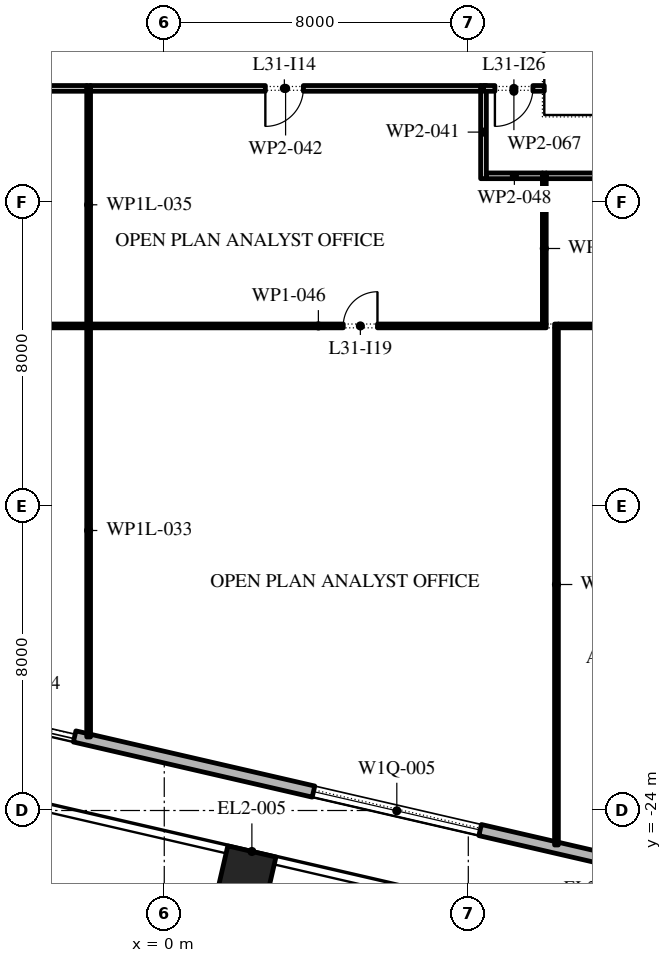
"""IFC4 building model, lengths in metres.
Left out: names, types, materials, properties, quantities, classifications, styles, units other than length and angle.
Written with IfcOpenShell. Run it as: python <this file> out.ifc"""

import sys

from ifc_helpers import new_model, si_unit, direction, frame, frame_2d, origin, origin_2d, place, context, subcontext, project, spatial, rectangle, extrude, element, fill, save


model = new_model("IFC4")
c1 = context("Model", 3, precision=1e-05, world=origin(), true_north=direction((0.0, 1.0)))
c2 = subcontext(c1, "Body", "Model", "MODEL_VIEW")
j1 = project(units=[si_unit("LENGTHUNIT", "METRE"), si_unit("PLANEANGLEUNIT", "RADIAN")], contexts=[c1])
p1 = place(None, origin())
s1 = spatial("IfcSite", under=j1, at=p1, CompositionType="ELEMENT")
p2 = place(p1, origin())
s2 = spatial("IfcBuilding", under=s1, at=p2, CompositionType="ELEMENT")
p3 = place(p2, frame((0.0, 0.0, 143.4)))
s3 = spatial("IfcBuildingStorey", under=s2, at=p3, CompositionType="ELEMENT", Elevation=143.4)
p4 = place(p3, frame((2.159, -25.711, 0.0), z_axis=(0.0, 0.0, 1.0), x_axis=(0.974370064785, -0.224951054344, 0.0)))
e1 = element("IfcColumn", 1, at=p4, inside=s3, PredefinedType="COLUMN", context=c2, shape_type="SweptSolid", body=[
    extrude(rectangle(XDim=1.3, YDim=1.3, at=origin_2d()), origin(), (0.0, 0.0, 1.0), 4.2),
])
p5 = place(p3, frame((-31.078, -15.421, 0.0), z_axis=(0.0, 0.0, 1.0), x_axis=(0.974370456532, -0.224949357493, 0.0)))
e2 = element("IfcWall", 2, at=p5, inside=s3, PredefinedType="STANDARD", context=c2, shape_type="SweptSolid", body=[
    extrude(rectangle(XDim=51.0, YDim=0.3, at=frame_2d((25.5, 0.0))), origin(), (0.0, 0.0, 1.0), 4.0),
])
p6 = place(p5, frame((1.875, 0.0, 0.45)))
e3 = element("IfcOpeningElement", 3, at=p6, cuts=e2, PredefinedType="OPENING", context=c2, shape_type="SweptSolid", body=[
    extrude(rectangle(XDim=4.5, YDim=2.575, at=frame_2d((2.25, 1.288))), frame((0.0, 0.16, 0.0), z_axis=(0.0, -1.0, 0.0), x_axis=(1.0, 0.0, 0.0)), (0.0, 0.0, 1.0), 0.32),
])
p7 = place(p5, frame((10.275, 0.0, 0.45)))
e4 = element("IfcOpeningElement", 4, at=p7, cuts=e2, PredefinedType="OPENING", context=c2, shape_type="SweptSolid", body=[
    extrude(rectangle(XDim=4.5, YDim=2.525, at=frame_2d((2.25, 1.262))), frame((0.0, 0.16, 0.0), z_axis=(0.0, -1.0, 0.0), x_axis=(1.0, 0.0, 0.0)), (0.0, 0.0, 1.0), 0.32),
])
p8 = place(p5, frame((18.825, 0.0, 0.45)))
e5 = element("IfcOpeningElement", 5, at=p8, cuts=e2, PredefinedType="OPENING", context=c2, shape_type="SweptSolid", body=[
    extrude(rectangle(XDim=4.5, YDim=2.5, at=frame_2d((2.25, 1.25))), frame((0.0, 0.16, 0.0), z_axis=(0.0, -1.0, 0.0), x_axis=(1.0, 0.0, 0.0)), (0.0, 0.0, 1.0), 0.32),
])
p9 = place(p5, frame((27.075, 0.0, 0.0)))
e6 = element("IfcOpeningElement", 6, at=p9, cuts=e2, PredefinedType="OPENING", context=c2, shape_type="SweptSolid", body=[
    extrude(rectangle(XDim=2.4, YDim=3.5, at=frame_2d((1.2, 1.75))), frame((0.0, 0.16, 0.0), z_axis=(0.0, -1.0, 0.0), x_axis=(1.0, 0.0, 0.0)), (0.0, 0.0, 1.0), 0.32),
])
p10 = place(p5, frame((35.925, 0.0, 0.45)))
e7 = element("IfcOpeningElement", 7, at=p10, cuts=e2, PredefinedType="OPENING", context=c2, shape_type="SweptSolid", body=[
    extrude(rectangle(XDim=4.5, YDim=2.45, at=frame_2d((2.25, 1.225))), frame((0.0, 0.16, 0.0), z_axis=(0.0, -1.0, 0.0), x_axis=(1.0, 0.0, 0.0)), (0.0, 0.0, 1.0), 0.32),
])
p11 = place(p5, frame((44.475, 0.0, 0.45)))
e8 = element("IfcOpeningElement", 8, at=p11, cuts=e2, PredefinedType="OPENING", context=c2, shape_type="SweptSolid", body=[
    extrude(rectangle(XDim=4.5, YDim=2.45, at=frame_2d((2.25, 1.225))), frame((0.0, 0.16, 0.0), z_axis=(0.0, -1.0, 0.0), x_axis=(1.0, 0.0, 0.0)), (0.0, 0.0, 1.0), 0.32),
])
p12 = place(p3, frame((-1.99, -22.065, 0.0), z_axis=(0.0, 0.0, 1.0), x_axis=(0.0, 1.0, 0.0)))
e9 = element("IfcWall", 9, at=p12, inside=s3, PredefinedType="PARTITIONING", context=c2, shape_type="SweptSolid", body=[
    extrude(rectangle(XDim=10.865, YDim=0.1, at=frame_2d((5.433, 0.0))), origin(), (0.0, 0.0, 1.0), 3.02),
])
p13 = place(p3, frame((-2.04, -11.25, 0.0), z_axis=(0.0, 0.0, 1.0), x_axis=(-1.0, 0.0, 0.0)))
e10 = element("IfcWall", 10, at=p13, inside=s3, PredefinedType="PARTITIONING", context=c2, shape_type="SweptSolid", body=[
    extrude(rectangle(XDim=8.23, YDim=0.1, at=frame_2d((4.115, 0.0))), origin(), (0.0, 0.0, 1.0), 4.0),
])
p14 = place(p13, frame((5.43, 0.0, 0.0)))
e11 = element("IfcOpeningElement", 11, at=p14, cuts=e10, PredefinedType="OPENING", context=c2, shape_type="SweptSolid", body=[
    extrude(rectangle(XDim=0.9, YDim=2.1, at=frame_2d((0.45, 1.05))), frame((0.0, 0.06, 0.0), z_axis=(0.0, -1.0, 0.0), x_axis=(1.0, 0.0, 0.0)), (0.0, 0.0, 1.0), 0.12),
])
p15 = place(p3, frame((-1.99, -11.2, 0.0), z_axis=(0.0, 0.0, 1.0), x_axis=(0.0, 1.0, 0.0)))
e12 = element("IfcWall", 12, at=p15, inside=s3, PredefinedType="PARTITIONING", context=c2, shape_type="SweptSolid", body=[
    extrude(rectangle(XDim=6.275, YDim=0.1, at=frame_2d((3.137, 0.0))), origin(), (0.0, 0.0, 1.0), 3.02),
])
p16 = place(p3, frame((-2.04, -5.0, 0.0), z_axis=(0.0, 0.0, 1.0), x_axis=(-1.0, 0.0, 0.0)))
e13 = element("IfcWall", 13, at=p16, inside=s3, PredefinedType="PARTITIONING", context=c2, shape_type="SweptSolid", body=[
    extrude(rectangle(XDim=6.285, YDim=0.15, at=frame_2d((3.143, 0.0))), origin(), (0.0, 0.0, 1.0), 4.0),
])
p17 = place(p3, frame((8.4, -7.375, 0.0), z_axis=(0.0, 0.0, 1.0), x_axis=(0.0, 1.0, 0.0)))
e14 = element("IfcWall", 14, at=p17, inside=s3, PredefinedType="PARTITIONING", context=c2, shape_type="SweptSolid", body=[
    extrude(rectangle(XDim=2.45, YDim=0.15, at=frame_2d((1.225, 0.0))), origin(), (0.0, 0.0, 1.0), 4.0),
])
p18 = place(p3, frame((8.325, -5.0, 0.0), z_axis=(0.0, 0.0, 1.0), x_axis=(-1.0, 0.0, 0.0)))
e15 = element("IfcWall", 15, at=p18, inside=s3, PredefinedType="PARTITIONING", context=c2, shape_type="SweptSolid", body=[
    extrude(rectangle(XDim=10.265, YDim=0.15, at=frame_2d((5.132, 0.0))), origin(), (0.0, 0.0, 1.0), 4.0),
])
p19 = place(p18, frame((4.665, 0.0, 0.0)))
e16 = element("IfcOpeningElement", 16, at=p19, cuts=e15, PredefinedType="OPENING", context=c2, shape_type="SweptSolid", body=[
    extrude(rectangle(XDim=1.0, YDim=2.1, at=frame_2d((0.5, 1.05))), frame((0.0, 0.085, 0.0), z_axis=(0.0, -1.0, 0.0), x_axis=(1.0, 0.0, 0.0)), (0.0, 0.0, 1.0), 0.17),
])
p20 = place(p3, frame((10.05, -11.25, 0.0), z_axis=(0.0, 0.0, 1.0), x_axis=(-1.0, 0.0, 0.0)))
e17 = element("IfcWall", 17, at=p20, inside=s3, PredefinedType="PARTITIONING", context=c2, shape_type="SweptSolid", body=[
    extrude(rectangle(XDim=11.99, YDim=0.1, at=frame_2d((5.995, 0.0))), origin(), (0.0, 0.0, 1.0), 4.0),
])
p21 = place(p20, frame((4.44, 0.0, 0.0)))
e18 = element("IfcOpeningElement", 18, at=p21, cuts=e17, PredefinedType="OPENING", context=c2, shape_type="SweptSolid", body=[
    extrude(rectangle(XDim=0.9, YDim=2.1, at=frame_2d((0.45, 1.05))), frame((0.0, 0.06, 0.0), z_axis=(0.0, -1.0, 0.0), x_axis=(1.0, 0.0, 0.0)), (0.0, 0.0, 1.0), 0.12),
])
p22 = place(p3, frame((10.0, -11.2, 0.0), z_axis=(0.0, 0.0, 1.0), x_axis=(0.0, 1.0, 0.0)))
e19 = element("IfcWall", 19, at=p22, inside=s3, PredefinedType="PARTITIONING", context=c2, shape_type="SweptSolid", body=[
    extrude(rectangle(XDim=3.975, YDim=0.1, at=frame_2d((1.987, 0.0))), origin(), (0.0, 0.0, 1.0), 4.0),
])
p23 = place(p3, frame((9.95, -7.3, 0.0), z_axis=(0.0, 0.0, 1.0), x_axis=(-1.0, 0.0, 0.0)))
e20 = element("IfcWall", 20, at=p23, inside=s3, PredefinedType="PARTITIONING", context=c2, shape_type="SweptSolid", body=[
    extrude(rectangle(XDim=1.475, YDim=0.15, at=frame_2d((0.737, 0.0))), origin(), (0.0, 0.0, 1.0), 4.0),
])
p24 = place(p3, frame((10.32, -24.907, 0.0), z_axis=(0.0, 0.0, 1.0), x_axis=(0.0, 1.0, 0.0)))
e21 = element("IfcWall", 21, at=p24, inside=s3, PredefinedType="PARTITIONING", context=c2, shape_type="SweptSolid", body=[
    extrude(rectangle(XDim=13.707, YDim=0.1, at=frame_2d((6.854, 0.0))), origin(), (0.0, 0.0, 1.0), 4.0),
])
p25 = place(p3, frame((18.6, -11.25, 0.0), z_axis=(0.0, 0.0, 1.0), x_axis=(-1.0, 0.0, 0.0)))
e22 = element("IfcWall", 22, at=p25, inside=s3, PredefinedType="PARTITIONING", context=c2, shape_type="SweptSolid", body=[
    extrude(rectangle(XDim=8.23, YDim=0.1, at=frame_2d((4.115, 0.0))), origin(), (0.0, 0.0, 1.0), 4.0),
])
p26 = place(p25, frame((1.93, 0.0, 0.0)))
e23 = element("IfcOpeningElement", 23, at=p26, cuts=e22, PredefinedType="OPENING", context=c2, shape_type="SweptSolid", body=[
    extrude(rectangle(XDim=0.9, YDim=2.1, at=frame_2d((0.45, 1.05))), frame((0.0, 0.06, 0.0), z_axis=(0.0, -1.0, 0.0), x_axis=(1.0, 0.0, 0.0)), (0.0, 0.0, 1.0), 0.12),
])
p27 = place(p3, frame((23.675, -7.3, 0.0), z_axis=(0.0, 0.0, 1.0), x_axis=(-1.0, 0.0, 0.0)))
e24 = element("IfcWall", 24, at=p27, inside=s3, PredefinedType="PARTITIONING", context=c2, shape_type="SweptSolid", body=[
    extrude(rectangle(XDim=13.625, YDim=0.15, at=frame_2d((6.812, 0.0))), origin(), (0.0, 0.0, 1.0), 4.0),
])
p28 = place(p27, frame((9.025, 0.0, 0.0)))
e25 = element("IfcOpeningElement", 25, at=p28, cuts=e24, PredefinedType="OPENING", context=c2, shape_type="SweptSolid", body=[
    extrude(rectangle(XDim=1.0, YDim=2.1, at=frame_2d((0.5, 1.05))), frame((0.0, 0.085, 0.0), z_axis=(0.0, -1.0, 0.0), x_axis=(1.0, 0.0, 0.0)), (0.0, 0.0, 1.0), 0.17),
])
p29 = place(p3, frame((10.0, -5.0, 0.0), z_axis=(0.0, 0.0, 1.0), x_axis=(-1.0, 0.0, 0.0)))
e26 = element("IfcWall", 26, at=p29, inside=s3, PredefinedType="PARTITIONING", context=c2, shape_type="SweptSolid", body=[
    extrude(rectangle(XDim=1.6, YDim=0.15, at=frame_2d((0.8, 0.0))), origin(), (0.0, 0.0, 1.0), 4.0),
])
p30 = place(p29, frame((0.3, 0.0, 0.0)))
e27 = element("IfcOpeningElement", 27, at=p30, cuts=e26, PredefinedType="OPENING", context=c2, shape_type="SweptSolid", body=[
    extrude(rectangle(XDim=1.0, YDim=2.1, at=frame_2d((0.5, 1.05))), frame((0.0, 0.085, 0.0), z_axis=(0.0, -1.0, 0.0), x_axis=(1.0, 0.0, 0.0)), (0.0, 0.0, 1.0), 0.17),
])
p31 = place(p9, origin())
e28 = element("IfcDoor", 28, at=p31, inside=s3, OperationType="DOUBLE_DOOR_SLIDING", PredefinedType="DOOR", context=c2, shape_type="SweptSolid", body=[
    extrude(rectangle(XDim=2.4, YDim=3.5, at=frame_2d((1.2, 1.75))), frame((0.0, 0.025, 0.0), z_axis=(0.0, -1.0, 0.0), x_axis=(1.0, 0.0, 0.0)), (0.0, 0.0, 1.0), 0.05),
])
fill(e6, e28)
p32 = place(p10, origin())
e29 = element("IfcWindow", 29, at=p32, inside=s3, PartitioningType="DOUBLE_PANEL_VERTICAL", PredefinedType="WINDOW", context=c2, shape_type="SweptSolid", body=[
    extrude(rectangle(XDim=4.5, YDim=2.45, at=frame_2d((2.25, 1.225))), frame((0.0, 0.03, 0.0), z_axis=(0.0, -1.0, 0.0), x_axis=(1.0, 0.0, 0.0)), (0.0, 0.0, 1.0), 0.06),
])
fill(e7, e29)
p33 = place(p19, origin())
e30 = element("IfcDoor", 30, at=p33, inside=s3, OperationType="SINGLE_SWING_LEFT", PredefinedType="DOOR", context=c2, shape_type="SweptSolid", body=[
    extrude(rectangle(XDim=1.0, YDim=2.1, at=frame_2d((0.5, 1.05))), frame((0.0, 0.025, 0.0), z_axis=(0.0, -1.0, 0.0), x_axis=(1.0, 0.0, 0.0)), (0.0, 0.0, 1.0), 0.05),
])
fill(e16, e30)
p34 = place(p21, frame((0.9, 0.0, 0.0), z_axis=(0.0, 0.0, 1.0), x_axis=(-1.0, 0.0, 0.0)))
e31 = element("IfcDoor", 31, at=p34, inside=s3, OperationType="SINGLE_SWING_LEFT", PredefinedType="DOOR", context=c2, shape_type="SweptSolid", body=[
    extrude(rectangle(XDim=0.9, YDim=2.1, at=frame_2d((0.45, 1.05))), frame((0.0, 0.025, 0.0), z_axis=(0.0, -1.0, 0.0), x_axis=(1.0, 0.0, 0.0)), (0.0, 0.0, 1.0), 0.05),
])
fill(e18, e31)
p35 = place(p30, origin())
e32 = element("IfcDoor", 32, at=p35, inside=s3, OperationType="SINGLE_SWING_LEFT", PredefinedType="DOOR", context=c2, shape_type="SweptSolid", body=[
    extrude(rectangle(XDim=1.0, YDim=2.1, at=frame_2d((0.5, 1.05))), frame((0.0, 0.025, 0.0), z_axis=(0.0, -1.0, 0.0), x_axis=(1.0, 0.0, 0.0)), (0.0, 0.0, 1.0), 0.05),
])
fill(e27, e32)
save(model, sys.argv[1])
